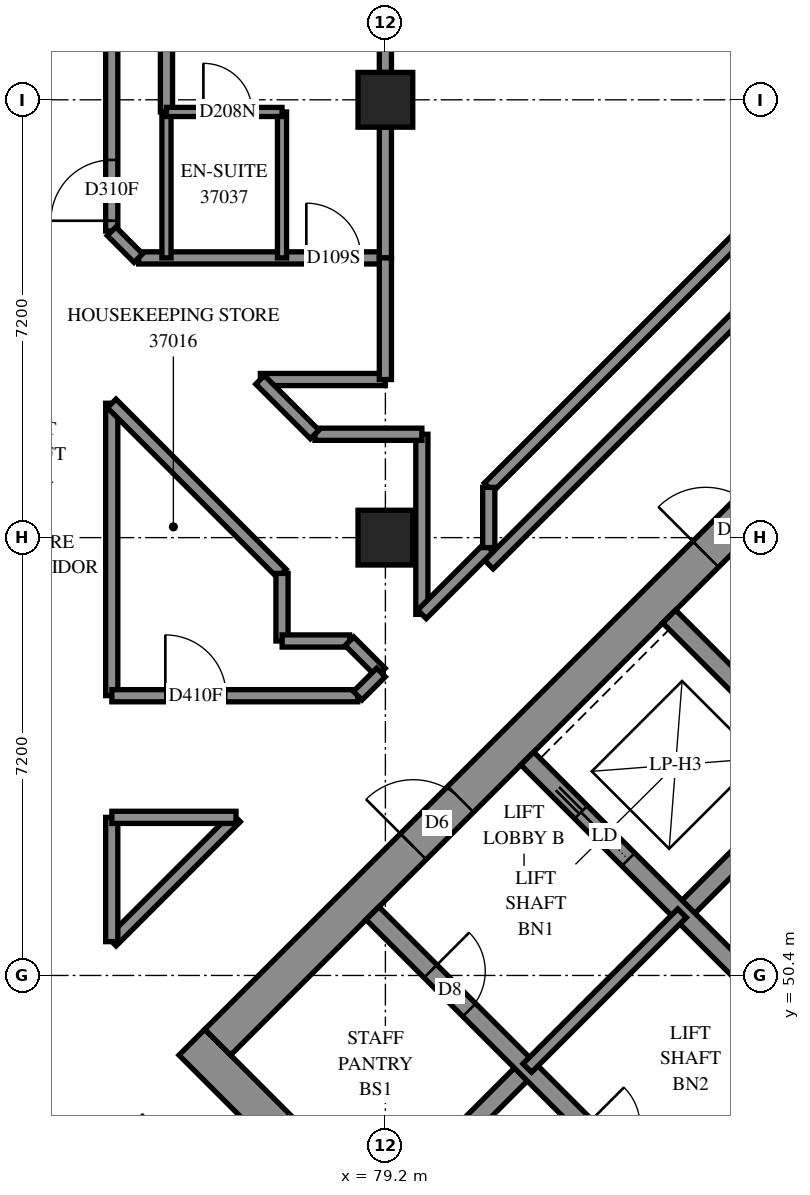
"""IFC4 building model, lengths in metres.
Left out: names, types, materials, properties, quantities, classifications, styles, units other than length and angle.
Written with IfcOpenShell. Run it as: python <this file> out.ifc"""

import sys

from ifc_helpers import new_model, si_unit, direction, frame, frame_2d, origin, origin_2d, place, context, subcontext, project, spatial, rectangle, extrude, element, fill, save


model = new_model("IFC4")
c1 = context("Model", 3, precision=1e-05, world=origin(), true_north=direction((0.0, 1.0)))
c2 = subcontext(c1, "Body", "Model", "MODEL_VIEW")
j1 = project(units=[si_unit("LENGTHUNIT", "METRE"), si_unit("PLANEANGLEUNIT", "RADIAN")], contexts=[c1])
p1 = place(None, origin())
s1 = spatial("IfcSite", under=j1, at=p1, CompositionType="ELEMENT")
p2 = place(p1, origin())
s2 = spatial("IfcBuilding", under=s1, at=p2, CompositionType="ELEMENT")
p3 = place(p2, frame((0.0, 0.0, 138.8)))
s3 = spatial("IfcBuildingStorey", under=s2, at=p3, CompositionType="ELEMENT", Elevation=138.8)
for number, where, z_axis, x_axis in (
    (1, (79.2, 57.6, 0.0), (0.0, 0.0, 1.0), (1.0, 0.0, 0.0)),
    (2, (79.2, 64.8, 0.0), (0.0, 0.0, 1.0), (1.0, 0.0, 0.0)),
):
    element("IfcColumn", number, at=place(p3, frame(where, z_axis=z_axis, x_axis=x_axis)), inside=s3, PredefinedType="COLUMN", context=c2, shape_type="SweptSolid", body=[
        extrude(rectangle(XDim=0.9, YDim=0.9, at=origin_2d()), origin(), (0.0, 0.0, 1.0), 3.1),
    ])
p4 = place(p3, frame((76.018, 49.302, -0.3), z_axis=(0.0, 0.0, 1.0), x_axis=(0.7071067812, -0.7071067812, 0.0)))
e3 = element("IfcWall", 3, at=p4, inside=s3, PredefinedType="SHEAR", context=c2, shape_type="SweptSolid", body=[
    extrude(rectangle(XDim=15.6, YDim=0.6, at=frame_2d((7.8, 0.0))), origin(), (0.0, 0.0, 1.0), 2.7),
])
p5 = place(p3, frame((76.442, 49.302, -0.3), z_axis=(0.0, 0.0, 1.0), x_axis=(0.7071067812, 0.7071067812, 0.0)))
e4 = element("IfcWall", 4, at=p5, inside=s3, PredefinedType="SHEAR", context=c2, shape_type="SweptSolid", body=[
    extrude(rectangle(XDim=14.4, YDim=0.6, at=frame_2d((7.2, 0.0))), origin(), (0.0, 0.0, 1.0), 2.7),
])
p6 = place(p5, frame((4.55, 0.0, 0.3)))
e5 = element("IfcOpeningElement", 5, at=p6, cuts=e4, PredefinedType="OPENING", context=c2, shape_type="SweptSolid", body=[
    extrude(rectangle(XDim=1.1, YDim=2.1, at=frame_2d((0.55, 1.05))), frame((0.0, 0.31, 0.0), z_axis=(0.0, -1.0, 0.0), x_axis=(1.0, 0.0, 0.0)), (0.0, 0.0, 1.0), 0.62),
])
p7 = place(p5, frame((11.35, 0.0, 0.3)))
e6 = element("IfcOpeningElement", 6, at=p7, cuts=e4, PredefinedType="OPENING", context=c2, shape_type="SweptSolid", body=[
    extrude(rectangle(XDim=1.1, YDim=2.1, at=frame_2d((0.55, 1.05))), frame((0.0, 0.31, 0.0), z_axis=(0.0, -1.0, 0.0), x_axis=(1.0, 0.0, 0.0)), (0.0, 0.0, 1.0), 0.62),
])
for number, where, z_axis, x_axis in (
    (7, (79.2, 46.544, 0.0), (0.0, 0.0, 1.0), (0.707, 0.707, 0.0)),
    (8, (84.079, 51.423, 0.0), (0.0, 0.0, 1.0), (0.707, 0.707, 0.0)),
):
    element("IfcWall", number, at=place(p3, frame(where, z_axis=z_axis, x_axis=x_axis)), inside=s3, PredefinedType="SOLIDWALL", context=c2, shape_type="SweptSolid", body=[
        extrude(rectangle(XDim=3.3, YDim=0.3, at=frame_2d((1.65, 0.0))), origin(), (0.0, 0.0, 1.0), 3.1),
    ])
p8 = place(p3, frame((78.988, 51.423, 0.0), z_axis=(0.0, 0.0, 1.0), x_axis=(0.7071067812, -0.7071067812, 0.0)))
e9 = element("IfcWall", 9, at=p8, inside=s3, PredefinedType="SOLIDWALL", context=c2, shape_type="SweptSolid", body=[
    extrude(rectangle(XDim=14.4, YDim=0.3, at=frame_2d((7.2, 0.0))), origin(), (0.0, 0.0, 1.0), 3.1),
])
p9 = place(p8, frame((1.35, 0.0, 0.0)))
e10 = element("IfcOpeningElement", 10, at=p9, cuts=e9, PredefinedType="OPENING", context=c2, shape_type="SweptSolid", body=[
    extrude(rectangle(XDim=0.9, YDim=2.1, at=frame_2d((0.45, 1.05))), frame((0.0, 0.16, 0.0), z_axis=(0.0, -1.0, 0.0), x_axis=(1.0, 0.0, 0.0)), (0.0, 0.0, 1.0), 0.32),
])
p10 = place(p8, frame((4.95, 0.0, 0.0)))
e11 = element("IfcOpeningElement", 11, at=p10, cuts=e9, PredefinedType="OPENING", context=c2, shape_type="SweptSolid", body=[
    extrude(rectangle(XDim=0.9, YDim=2.1, at=frame_2d((0.45, 1.05))), frame((0.0, 0.16, 0.0), z_axis=(0.0, -1.0, 0.0), x_axis=(1.0, 0.0, 0.0)), (0.0, 0.0, 1.0), 0.32),
])
p11 = place(p8, frame((8.55, 0.0, 0.0)))
e12 = element("IfcOpeningElement", 12, at=p11, cuts=e9, PredefinedType="OPENING", context=c2, shape_type="SweptSolid", body=[
    extrude(rectangle(XDim=0.9, YDim=2.1, at=frame_2d((0.45, 1.05))), frame((0.0, 0.16, 0.0), z_axis=(0.0, -1.0, 0.0), x_axis=(1.0, 0.0, 0.0)), (0.0, 0.0, 1.0), 0.32),
])
p12 = place(p8, frame((12.05, 0.0, 0.0)))
e13 = element("IfcOpeningElement", 13, at=p12, cuts=e9, PredefinedType="OPENING", context=c2, shape_type="SweptSolid", body=[
    extrude(rectangle(XDim=1.1, YDim=2.1, at=frame_2d((0.55, 1.05))), frame((0.0, 0.16, 0.0), z_axis=(0.0, -1.0, 0.0), x_axis=(1.0, 0.0, 0.0)), (0.0, 0.0, 1.0), 0.32),
])
p13 = place(p3, frame((81.534, 53.969, 0.0), z_axis=(0.0, 0.0, 1.0), x_axis=(0.707103309, -0.7071102534, 0.0)))
e14 = element("IfcWall", 14, at=p13, inside=s3, PredefinedType="SOLIDWALL", context=c2, shape_type="SweptSolid", body=[
    extrude(rectangle(XDim=14.4, YDim=0.3, at=frame_2d((7.2, 0.0))), origin(), (0.0, 0.0, 1.0), 3.1),
])
p14 = place(p13, frame((1.25, 0.0, 0.0)))
e15 = element("IfcOpeningElement", 15, at=p14, cuts=e14, PredefinedType="OPENING", context=c2, shape_type="SweptSolid", body=[
    extrude(rectangle(XDim=1.1, YDim=2.1, at=frame_2d((0.55, 1.05))), frame((0.0, 0.16, 0.0), z_axis=(0.0, -1.0, 0.0), x_axis=(1.0, 0.0, 0.0)), (0.0, 0.0, 1.0), 0.32),
])
p15 = place(p13, frame((4.85, 0.0, 0.0)))
e16 = element("IfcOpeningElement", 16, at=p15, cuts=e14, PredefinedType="OPENING", context=c2, shape_type="SweptSolid", body=[
    extrude(rectangle(XDim=1.1, YDim=2.1, at=frame_2d((0.55, 1.05))), frame((0.0, 0.16, 0.0), z_axis=(0.0, -1.0, 0.0), x_axis=(1.0, 0.0, 0.0)), (0.0, 0.0, 1.0), 0.32),
])
p16 = place(p13, frame((8.45, 0.0, 0.0)))
e17 = element("IfcOpeningElement", 17, at=p16, cuts=e14, PredefinedType="OPENING", context=c2, shape_type="SweptSolid", body=[
    extrude(rectangle(XDim=1.1, YDim=2.1, at=frame_2d((0.55, 1.05))), frame((0.0, 0.16, 0.0), z_axis=(0.0, -1.0, 0.0), x_axis=(1.0, 0.0, 0.0)), (0.0, 0.0, 1.0), 0.32),
])
p17 = place(p13, frame((12.05, 0.0, 0.0)))
e18 = element("IfcOpeningElement", 18, at=p17, cuts=e14, PredefinedType="OPENING", context=c2, shape_type="SweptSolid", body=[
    extrude(rectangle(XDim=1.1, YDim=2.1, at=frame_2d((0.55, 1.05))), frame((0.0, 0.16, 0.0), z_axis=(0.0, -1.0, 0.0), x_axis=(1.0, 0.0, 0.0)), (0.0, 0.0, 1.0), 0.32),
])
p18 = place(p3, frame((83.867, 56.302, 0.0), z_axis=(0.0, 0.0, 1.0), x_axis=(0.7071137256, -0.7070998367, 0.0)))
e19 = element("IfcWall", 19, at=p18, inside=s3, PredefinedType="SOLIDWALL", context=c2, shape_type="SweptSolid", body=[
    extrude(rectangle(XDim=7.2, YDim=0.3, at=frame_2d((3.6, 0.0))), origin(), (0.0, 0.0, 1.0), 3.1),
])
p19 = place(p3, frame((81.534, 48.878, 0.0), z_axis=(0.0, 0.0, 1.0), x_axis=(0.707092892, 0.7071206701, 0.0)))
e20 = element("IfcWall", 20, at=p19, inside=s3, PredefinedType="PARTITIONING", context=c2, shape_type="SweptSolid", body=[
    extrude(rectangle(XDim=3.6, YDim=0.2, at=frame_2d((1.8, 0.0))), origin(), (0.0, 0.0, 1.0), 3.1),
])
p20 = place(p3, frame((80.899, 58.427, 0.0), z_axis=(0.0, 0.0, 1.0), x_axis=(0.7071121886, 0.7071013737, 0.0)))
e21 = element("IfcWall", 21, at=p20, inside=s3, PredefinedType="PARTITIONING", context=c2, shape_type="SweptSolid", body=[
    extrude(rectangle(XDim=9.246, YDim=0.2, at=frame_2d((4.623, 0.0))), origin(), (0.0, 0.0, 1.0), 3.1),
])
p21 = place(p3, frame((80.901, 57.157, 0.0), z_axis=(0.0, 0.0, 1.0), x_axis=(0.7071067812, 0.7071067812, 0.0)))
e22 = element("IfcWall", 22, at=p21, inside=s3, PredefinedType="PARTITIONING", context=c2, shape_type="SweptSolid", body=[
    extrude(rectangle(XDim=8.392, YDim=0.2, at=frame_2d((4.196, 0.0))), origin(), (0.0, 0.0, 1.0), 3.1),
])
p22 = place(p3, frame((75.6, 64.6, 0.0), z_axis=(0.0, 0.0, 1.0), x_axis=(0.0, 1.0, 0.0)))
e23 = element("IfcWall", 23, at=p22, inside=s3, PredefinedType="PARTITIONING", context=c2, shape_type="SweptSolid", body=[
    extrude(rectangle(XDim=8.159, YDim=0.2, at=frame_2d((4.079, 0.0))), origin(), (0.0, 0.0, 1.0), 3.1),
])
p23 = place(p3, frame((79.2, 65.25, 0.0), z_axis=(0.0, 0.0, 1.0), x_axis=(0.0, 1.0, 0.0)))
e24 = element("IfcWall", 24, at=p23, inside=s3, PredefinedType="PARTITIONING", context=c2, shape_type="SweptSolid", body=[
    extrude(rectangle(XDim=6.3, YDim=0.2, at=frame_2d((3.15, 0.0))), origin(), (0.0, 0.0, 1.0), 3.1),
])
p24 = place(p3, frame((74.7, 62.642, 0.0), z_axis=(0.0, 0.0, 1.0), x_axis=(0.0, 1.0, 0.0)))
e25 = element("IfcWall", 25, at=p24, inside=s3, PredefinedType="PARTITIONING", context=c2, shape_type="SweptSolid", body=[
    extrude(rectangle(XDim=4.858, YDim=0.2, at=frame_2d((2.429, 0.0))), origin(), (0.0, 0.0, 1.0), 3.1),
])
p25 = place(p24, frame((0.169, 0.0, 0.0)))
e26 = element("IfcOpeningElement", 26, at=p25, cuts=e25, PredefinedType="OPENING", context=c2, shape_type="SweptSolid", body=[
    extrude(rectangle(XDim=1.0, YDim=2.1, at=frame_2d((0.5, 1.05))), frame((0.0, 0.11, 0.0), z_axis=(0.0, -1.0, 0.0), x_axis=(1.0, 0.0, 0.0)), (0.0, 0.0, 1.0), 0.22),
])
p26 = place(p3, frame((74.7, 55.002, 0.0), z_axis=(0.0, 0.0, 1.0), x_axis=(0.0, 1.0, 0.0)))
e27 = element("IfcWall", 27, at=p26, inside=s3, PredefinedType="PARTITIONING", context=c2, shape_type="SweptSolid", body=[
    extrude(rectangle(XDim=4.808, YDim=0.2, at=frame_2d((2.404, 0.0))), origin(), (0.0, 0.0, 1.0), 3.1),
])
p27 = place(p3, frame((75.142, 62.2, 0.0), z_axis=(0.0, 0.0, 1.0), x_axis=(1.0, 0.0, 0.0)))
e28 = element("IfcWall", 28, at=p27, inside=s3, PredefinedType="PARTITIONING", context=c2, shape_type="SweptSolid", body=[
    extrude(rectangle(XDim=4.058, YDim=0.2, at=frame_2d((2.029, 0.0))), origin(), (0.0, 0.0, 1.0), 3.1),
])
p28 = place(p27, frame((2.758, 0.0, 0.0)))
e29 = element("IfcOpeningElement", 29, at=p28, cuts=e28, PredefinedType="OPENING", context=c2, shape_type="SweptSolid", body=[
    extrude(rectangle(XDim=0.9, YDim=2.1, at=frame_2d((0.45, 1.05))), frame((0.0, 0.11, 0.0), z_axis=(0.0, -1.0, 0.0), x_axis=(1.0, 0.0, 0.0)), (0.0, 0.0, 1.0), 0.22),
])
p29 = place(p3, frame((74.702, 55.0, 0.0), z_axis=(0.0, 0.0, 1.0), x_axis=(1.0, 0.0, 0.0)))
e30 = element("IfcWall", 30, at=p29, inside=s3, PredefinedType="PARTITIONING", context=c2, shape_type="SweptSolid", body=[
    extrude(rectangle(XDim=4.044, YDim=0.2, at=frame_2d((2.022, 0.0))), origin(), (0.0, 0.0, 1.0), 3.1),
])
p30 = place(p29, frame((0.879, 0.0, 0.0)))
e31 = element("IfcOpeningElement", 31, at=p30, cuts=e30, PredefinedType="OPENING", context=c2, shape_type="SweptSolid", body=[
    extrude(rectangle(XDim=1.0, YDim=2.1, at=frame_2d((0.5, 1.05))), frame((0.0, 0.11, 0.0), z_axis=(0.0, -1.0, 0.0), x_axis=(1.0, 0.0, 0.0)), (0.0, 0.0, 1.0), 0.22),
])
p31 = place(p3, frame((74.699, 59.807, 0.0), z_axis=(0.0, 0.0, 1.0), x_axis=(0.7071067812, -0.7071067812, 0.0)))
e32 = element("IfcWall", 32, at=p31, inside=s3, PredefinedType="PARTITIONING", context=c2, shape_type="SweptSolid", body=[
    extrude(rectangle(XDim=3.957, YDim=0.2, at=frame_2d((1.978, 0.0))), origin(), (0.0, 0.0, 1.0), 3.1),
])
p32 = place(p3, frame((79.8, 56.338, 0.0), z_axis=(0.0, 0.0, 1.0), x_axis=(0.0, 1.0, 0.0)))
e33 = element("IfcWall", 33, at=p32, inside=s3, PredefinedType="PARTITIONING", context=c2, shape_type="SweptSolid", body=[
    extrude(rectangle(XDim=2.962, YDim=0.2, at=frame_2d((1.481, 0.0))), origin(), (0.0, 0.0, 1.0), 3.1),
])
p33 = place(p3, frame((74.701, 50.957, 0.0), z_axis=(0.0, 0.0, 1.0), x_axis=(0.7071067812, 0.7071067812, 0.0)))
e34 = element("IfcWall", 34, at=p33, inside=s3, PredefinedType="PARTITIONING", context=c2, shape_type="SweptSolid", body=[
    extrude(rectangle(XDim=2.888, YDim=0.2, at=frame_2d((1.444, 0.0))), origin(), (0.0, 0.0, 1.0), 3.1),
])
for number, where, z_axis, x_axis in (
    (35, (75.6, 62.2, 0.0), (0.0, 0.0, 1.0), (0.0, 1.0, 0.0)),
    (36, (77.5, 62.2, 0.0), (0.0, 0.0, 1.0), (0.0, 1.0, 0.0)),
):
    element("IfcWall", number, at=place(p3, frame(where, z_axis=z_axis, x_axis=x_axis)), inside=s3, PredefinedType="PARTITIONING", context=c2, shape_type="SweptSolid", body=[
        extrude(rectangle(XDim=2.4, YDim=0.15, at=frame_2d((1.2, 0.0))), origin(), (0.0, 0.0, 1.0), 3.1),
    ])
p34 = place(p3, frame((79.2, 62.2, 0.0), z_axis=(0.0, 0.0, 1.0), x_axis=(0.0, 1.0, 0.0)))
e37 = element("IfcWall", 37, at=p34, inside=s3, PredefinedType="PARTITIONING", context=c2, shape_type="SweptSolid", body=[
    extrude(rectangle(XDim=2.15, YDim=0.2, at=frame_2d((1.075, 0.0))), origin(), (0.0, 0.0, 1.0), 3.1),
])
p35 = place(p3, frame((77.144, 60.2, 0.0), z_axis=(0.0, 0.0, 1.0), x_axis=(1.0, 0.0, 0.0)))
e38 = element("IfcWall", 38, at=p35, inside=s3, PredefinedType="PARTITIONING", context=c2, shape_type="SweptSolid", body=[
    extrude(rectangle(XDim=2.056, YDim=0.2, at=frame_2d((1.028, 0.0))), origin(), (0.0, 0.0, 1.0), 3.1),
])
p36 = place(p3, frame((74.7, 50.956, 0.0), z_axis=(0.0, 0.0, 1.0), x_axis=(0.0, 1.0, 0.0)))
e39 = element("IfcWall", 39, at=p36, inside=s3, PredefinedType="PARTITIONING", context=c2, shape_type="SweptSolid", body=[
    extrude(rectangle(XDim=2.044, YDim=0.2, at=frame_2d((1.022, 0.0))), origin(), (0.0, 0.0, 1.0), 3.1),
])
p37 = place(p3, frame((74.702, 53.0, 0.0), z_axis=(0.0, 0.0, 1.0), x_axis=(1.0, 0.0, 0.0)))
e40 = element("IfcWall", 40, at=p37, inside=s3, PredefinedType="PARTITIONING", context=c2, shape_type="SweptSolid", body=[
    extrude(rectangle(XDim=2.042, YDim=0.2, at=frame_2d((1.021, 0.0))), origin(), (0.0, 0.0, 1.0), 3.1),
])
p38 = place(p3, frame((79.2, 60.2, 0.0), z_axis=(0.0, 0.0, 1.0), x_axis=(0.0, 1.0, 0.0)))
e41 = element("IfcWall", 41, at=p38, inside=s3, PredefinedType="PARTITIONING", context=c2, shape_type="SweptSolid", body=[
    extrude(rectangle(XDim=2.0, YDim=0.2, at=frame_2d((1.0, 0.0))), origin(), (0.0, 0.0, 1.0), 3.1),
])
p39 = place(p3, frame((75.6, 64.6, 0.0), z_axis=(0.0, 0.0, 1.0), x_axis=(1.0, 0.0, 0.0)))
e42 = element("IfcWall", 42, at=p39, inside=s3, PredefinedType="PARTITIONING", context=c2, shape_type="SweptSolid", body=[
    extrude(rectangle(XDim=1.9, YDim=0.15, at=frame_2d((0.95, 0.0))), origin(), (0.0, 0.0, 1.0), 3.1),
])
p40 = place(p39, frame((0.607, 0.0, 0.0)))
e43 = element("IfcOpeningElement", 43, at=p40, cuts=e42, PredefinedType="OPENING", context=c2, shape_type="SweptSolid", body=[
    extrude(rectangle(XDim=0.8, YDim=2.1, at=frame_2d((0.4, 1.05))), frame((0.0, 0.085, 0.0), z_axis=(0.0, -1.0, 0.0), x_axis=(1.0, 0.0, 0.0)), (0.0, 0.0, 1.0), 0.17),
])
p41 = place(p3, frame((78.042, 59.3, 0.0), z_axis=(0.0, 0.0, 1.0), x_axis=(1.0, 0.0, 0.0)))
e44 = element("IfcWall", 44, at=p41, inside=s3, PredefinedType="PARTITIONING", context=c2, shape_type="SweptSolid", body=[
    extrude(rectangle(XDim=1.758, YDim=0.2, at=frame_2d((0.879, 0.0))), origin(), (0.0, 0.0, 1.0), 3.1),
])
p42 = place(p3, frame((79.801, 56.339, 0.0), z_axis=(0.0, 0.0, 1.0), x_axis=(0.7071067812, 0.7071067812, 0.0)))
e45 = element("IfcWall", 45, at=p42, inside=s3, PredefinedType="PARTITIONING", context=c2, shape_type="SweptSolid", body=[
    extrude(rectangle(XDim=1.553, YDim=0.2, at=frame_2d((0.776, 0.0))), origin(), (0.0, 0.0, 1.0), 3.1),
])
p43 = place(p3, frame((77.139, 60.195, 0.0), z_axis=(0.0, 0.0, 1.0), x_axis=(0.7071067812, -0.7071067812, 0.0)))
e46 = element("IfcWall", 46, at=p43, inside=s3, PredefinedType="PARTITIONING", context=c2, shape_type="SweptSolid", body=[
    extrude(rectangle(XDim=1.27, YDim=0.2, at=frame_2d((0.635, 0.0))), origin(), (0.0, 0.0, 1.0), 3.1),
])
p44 = place(p3, frame((77.5, 55.9, 0.0), z_axis=(0.0, 0.0, 1.0), x_axis=(0.0, 1.0, 0.0)))
e47 = element("IfcWall", 47, at=p44, inside=s3, PredefinedType="PARTITIONING", context=c2, shape_type="SweptSolid", body=[
    extrude(rectangle(XDim=1.112, YDim=0.2, at=frame_2d((0.556, 0.0))), origin(), (0.0, 0.0, 1.0), 3.1),
])
p45 = place(p3, frame((77.502, 55.9, 0.0), z_axis=(0.0, 0.0, 1.0), x_axis=(1.0, 0.0, 0.0)))
e48 = element("IfcWall", 48, at=p45, inside=s3, PredefinedType="PARTITIONING", context=c2, shape_type="SweptSolid", body=[
    extrude(rectangle(XDim=1.11, YDim=0.2, at=frame_2d((0.555, 0.0))), origin(), (0.0, 0.0, 1.0), 3.1),
])
p46 = place(p3, frame((80.9, 57.436, 0.0), z_axis=(0.0, 0.0, 1.0), x_axis=(0.0, 1.0, 0.0)))
e49 = element("IfcWall", 49, at=p46, inside=s3, PredefinedType="PARTITIONING", context=c2, shape_type="SweptSolid", body=[
    extrude(rectangle(XDim=0.99, YDim=0.2, at=frame_2d((0.495, 0.0))), origin(), (0.0, 0.0, 1.0), 3.1),
])
p47 = place(p3, frame((78.609, 55.897, 0.0), z_axis=(0.0, 0.0, 1.0), x_axis=(0.7071067812, -0.7071067812, 0.0)))
e50 = element("IfcWall", 50, at=p47, inside=s3, PredefinedType="PARTITIONING", context=c2, shape_type="SweptSolid", body=[
    extrude(rectangle(XDim=0.73, YDim=0.2, at=frame_2d((0.365, 0.0))), origin(), (0.0, 0.0, 1.0), 3.1),
])
p48 = place(p3, frame((74.697, 62.637, 0.0), z_axis=(0.0, 0.0, 1.0), x_axis=(0.7071067812, -0.7071067812, 0.0)))
e51 = element("IfcWall", 51, at=p48, inside=s3, PredefinedType="PARTITIONING", context=c2, shape_type="SweptSolid", body=[
    extrude(rectangle(XDim=0.622, YDim=0.2, at=frame_2d((0.311, 0.0))), origin(), (0.0, 0.0, 1.0), 3.1),
])
p49 = place(p3, frame((78.745, 55.001, 0.0), z_axis=(0.0, 0.0, 1.0), x_axis=(0.7071067812, 0.7071067812, 0.0)))
e52 = element("IfcWall", 52, at=p49, inside=s3, PredefinedType="PARTITIONING", context=c2, shape_type="SweptSolid", body=[
    extrude(rectangle(XDim=0.54, YDim=0.2, at=frame_2d((0.27, 0.0))), origin(), (0.0, 0.0, 1.0), 3.1),
])
p50 = place(p6, origin())
e53 = element("IfcDoor", 53, at=p50, inside=s3, OperationType="DOUBLE_DOOR_SINGLE_SWING", PredefinedType="DOOR", context=c2, shape_type="SweptSolid", body=[
    extrude(rectangle(XDim=1.1, YDim=2.1, at=frame_2d((0.55, 1.05))), frame((0.0, 0.025, 0.0), z_axis=(0.0, -1.0, 0.0), x_axis=(1.0, 0.0, 0.0)), (0.0, 0.0, 1.0), 0.05),
])
fill(e5, e53)
p51 = place(p7, origin())
e54 = element("IfcDoor", 54, at=p51, inside=s3, OperationType="SINGLE_SWING_LEFT", PredefinedType="DOOR", context=c2, shape_type="SweptSolid", body=[
    extrude(rectangle(XDim=1.1, YDim=2.1, at=frame_2d((0.55, 1.05))), frame((0.0, 0.025, 0.0), z_axis=(0.0, -1.0, 0.0), x_axis=(1.0, 0.0, 0.0)), (0.0, 0.0, 1.0), 0.05),
])
fill(e6, e54)
p52 = place(p9, origin())
e55 = element("IfcDoor", 55, at=p52, inside=s3, OperationType="SINGLE_SWING_LEFT", PredefinedType="DOOR", context=c2, shape_type="SweptSolid", body=[
    extrude(rectangle(XDim=0.9, YDim=2.1, at=frame_2d((0.45, 1.05))), frame((0.0, 0.025, 0.0), z_axis=(0.0, -1.0, 0.0), x_axis=(1.0, 0.0, 0.0)), (0.0, 0.0, 1.0), 0.05),
])
fill(e10, e55)
p53 = place(p14, origin())
e56 = element("IfcDoor", 56, at=p53, inside=s3, OperationType="SLIDING_TO_LEFT", PredefinedType="DOOR", context=c2, shape_type="SweptSolid", body=[
    extrude(rectangle(XDim=1.1, YDim=2.1, at=frame_2d((0.55, 1.05))), frame((0.0, 0.025, 0.0), z_axis=(0.0, -1.0, 0.0), x_axis=(1.0, 0.0, 0.0)), (0.0, 0.0, 1.0), 0.05),
])
fill(e15, e56)
p54 = place(p30, origin())
e57 = element("IfcDoor", 57, at=p54, inside=s3, OperationType="SINGLE_SWING_LEFT", PredefinedType="DOOR", context=c2, shape_type="SweptSolid", body=[
    extrude(rectangle(XDim=1.0, YDim=2.1, at=frame_2d((0.5, 1.05))), frame((0.0, 0.025, 0.0), z_axis=(0.0, -1.0, 0.0), x_axis=(1.0, 0.0, 0.0)), (0.0, 0.0, 1.0), 0.05),
])
fill(e31, e57)
p55 = place(p25, origin())
e58 = element("IfcDoor", 58, at=p55, inside=s3, OperationType="SINGLE_SWING_RIGHT", PredefinedType="DOOR", context=c2, shape_type="SweptSolid", body=[
    extrude(rectangle(XDim=1.0, YDim=2.1, at=frame_2d((0.5, 1.05))), frame((0.0, 0.025, 0.0), z_axis=(0.0, -1.0, 0.0), x_axis=(1.0, 0.0, 0.0)), (0.0, 0.0, 1.0), 0.05),
])
fill(e26, e58)
p56 = place(p28, origin())
e59 = element("IfcDoor", 59, at=p56, inside=s3, OperationType="SINGLE_SWING_LEFT", PredefinedType="DOOR", context=c2, shape_type="SweptSolid", body=[
    extrude(rectangle(XDim=0.9, YDim=2.1, at=frame_2d((0.45, 1.05))), frame((0.0, 0.025, 0.0), z_axis=(0.0, -1.0, 0.0), x_axis=(1.0, 0.0, 0.0)), (0.0, 0.0, 1.0), 0.05),
])
fill(e29, e59)
p57 = place(p40, origin())
e60 = element("IfcDoor", 60, at=p57, inside=s3, OperationType="SINGLE_SWING_RIGHT", PredefinedType="DOOR", context=c2, shape_type="SweptSolid", body=[
    extrude(rectangle(XDim=0.8, YDim=2.1, at=frame_2d((0.4, 1.05))), frame((0.0, 0.025, 0.0), z_axis=(0.0, -1.0, 0.0), x_axis=(1.0, 0.0, 0.0)), (0.0, 0.0, 1.0), 0.05),
])
fill(e43, e60)
save(model, sys.argv[1])
